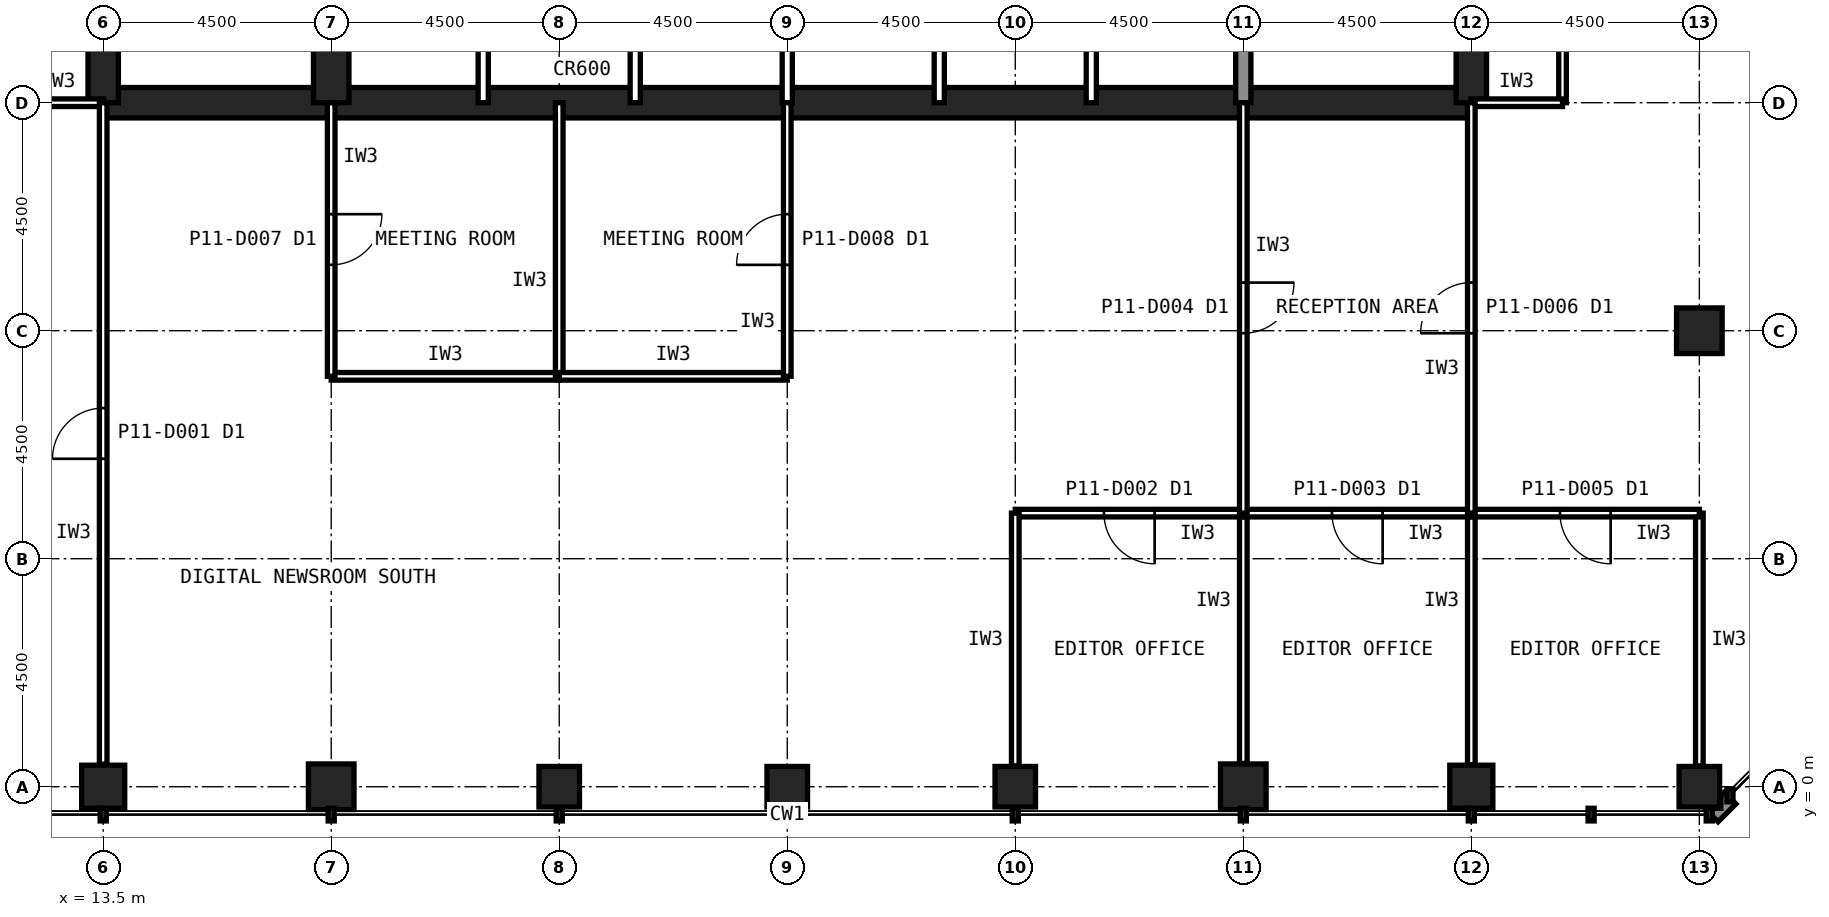
"""IFC4 building model, lengths in metres.
Left out: names, types, materials, properties, quantities, classifications, styles, units other than length and angle.
Written with IfcOpenShell. Run it as: python <this file> out.ifc"""

import sys

from ifc_helpers import new_model, si_unit, direction, frame, frame_2d, origin, origin_2d, place, context, subcontext, project, spatial, rectangle, hollow_rectangle, extrude, element, fill, save


model = new_model("IFC4")
c1 = context("Model", 3, precision=1e-05, world=origin(), true_north=direction((0.0, 1.0)))
c2 = subcontext(c1, "Body", "Model", "MODEL_VIEW")
j1 = project(units=[si_unit("LENGTHUNIT", "METRE"), si_unit("PLANEANGLEUNIT", "RADIAN")], contexts=[c1])
p1 = place(None, origin())
s1 = spatial("IfcSite", under=j1, at=p1, CompositionType="ELEMENT")
p2 = place(p1, origin())
s2 = spatial("IfcBuilding", under=s1, at=p2, CompositionType="ELEMENT")
p3 = place(p2, frame((0.0, 0.0, 45.8)))
s3 = spatial("IfcBuildingStorey", under=s2, at=p3, CompositionType="ELEMENT", Elevation=45.8)
p4 = place(p3, frame((13.5, 0.0, 0.0), z_axis=(0.0, 0.0, 1.0), x_axis=(1.0, 0.0, 0.0)))
e1 = element("IfcColumn", 1, at=p4, inside=s3, PredefinedType="COLUMN", context=c2, shape_type="SweptSolid", body=[
    extrude(hollow_rectangle(XDim=0.85, YDim=0.85, WallThickness=0.05, at=origin_2d()), origin(), (0.0, 0.0, 1.0), 4.2),
])
p5 = place(p3, frame((18.0, 0.0, 0.0), z_axis=(0.0, 0.0, 1.0), x_axis=(1.0, 0.0, 0.0)))
e2 = element("IfcColumn", 2, at=p5, inside=s3, PredefinedType="COLUMN", context=c2, shape_type="SweptSolid", body=[
    extrude(hollow_rectangle(XDim=0.9, YDim=0.9, WallThickness=0.063, at=origin_2d()), origin(), (0.0, 0.0, 1.0), 4.2),
])
for number, where, z_axis, x_axis in (
    (3, (22.5, 0.0, 0.0), (0.0, 0.0, 1.0), (1.0, 0.0, 0.0)),
    (4, (27.0, 0.0, 0.0), (0.0, 0.0, 1.0), (1.0, 0.0, 0.0)),
    (5, (31.5, 0.0, 0.0), (0.0, 0.0, 1.0), (1.0, 0.0, 0.0)),
):
    element("IfcColumn", number, at=place(p3, frame(where, z_axis=z_axis, x_axis=x_axis)), inside=s3, PredefinedType="COLUMN", context=c2, shape_type="SweptSolid", body=[
        extrude(hollow_rectangle(XDim=0.8, YDim=0.8, WallThickness=0.045, at=origin_2d()), origin(), (0.0, 0.0, 1.0), 4.2),
    ])
p6 = place(p3, frame((36.0, 0.0, 0.0), z_axis=(0.0, 0.0, 1.0), x_axis=(1.0, 0.0, 0.0)))
e6 = element("IfcColumn", 6, at=p6, inside=s3, PredefinedType="COLUMN", context=c2, shape_type="SweptSolid", body=[
    extrude(hollow_rectangle(XDim=0.9, YDim=0.9, WallThickness=0.063, at=origin_2d()), origin(), (0.0, 0.0, 1.0), 4.2),
])
p7 = place(p3, frame((40.5, 0.0, 0.0), z_axis=(0.0, 0.0, 1.0), x_axis=(1.0, 0.0, 0.0)))
e7 = element("IfcColumn", 7, at=p7, inside=s3, PredefinedType="COLUMN", context=c2, shape_type="SweptSolid", body=[
    extrude(hollow_rectangle(XDim=0.85, YDim=0.85, WallThickness=0.05, at=origin_2d()), origin(), (0.0, 0.0, 1.0), 4.2),
])
p8 = place(p3, frame((45.0, 0.0, 0.0), z_axis=(0.0, 0.0, 1.0), x_axis=(1.0, 0.0, 0.0)))
e8 = element("IfcColumn", 8, at=p8, inside=s3, PredefinedType="COLUMN", context=c2, shape_type="SweptSolid", body=[
    extrude(hollow_rectangle(XDim=0.8, YDim=0.8, WallThickness=0.045, at=origin_2d()), origin(), (0.0, 0.0, 1.0), 4.2),
])
p9 = place(p3, frame((45.0, 9.0, 0.0), z_axis=(0.0, 0.0, 1.0), x_axis=(1.0, 0.0, 0.0)))
e9 = element("IfcColumn", 9, at=p9, inside=s3, PredefinedType="COLUMN", context=c2, shape_type="SweptSolid", body=[
    extrude(hollow_rectangle(XDim=0.9, YDim=0.9, WallThickness=0.063, at=origin_2d()), origin(), (0.0, 0.0, 1.0), 4.2),
])
p10 = place(p3, frame((13.5, 13.5, 0.0), z_axis=(0.0, 0.0, 1.0), x_axis=(1.0, 0.0, 0.0)))
e10 = element("IfcWall", 10, at=p10, inside=s3, PredefinedType="SHEAR", context=c2, shape_type="SweptSolid", body=[
    extrude(rectangle(XDim=27.0, YDim=0.6, at=frame_2d((13.5, 0.0))), origin(), (0.0, 0.0, 1.0), 4.2),
])
p11 = place(p3, frame((40.5, 13.5, 0.0), z_axis=(0.0, 0.0, 1.0), x_axis=(0.0, 1.0, 0.0)))
e11 = element("IfcWall", 11, at=p11, inside=s3, PredefinedType="SHEAR", context=c2, shape_type="SweptSolid", body=[
    extrude(rectangle(XDim=27.0, YDim=0.6, at=frame_2d((13.5, 0.0))), origin(), (0.0, 0.0, 1.0), 4.2),
])
p12 = place(p11, frame((5.85, 0.0, 0.0)))
e12 = element("IfcOpeningElement", 12, at=p12, cuts=e11, PredefinedType="OPENING", context=c2, shape_type="SweptSolid", body=[
    extrude(rectangle(XDim=1.8, YDim=2.1, at=frame_2d((0.9, 1.05))), frame((0.0, 0.31, 0.0), z_axis=(0.0, -1.0, 0.0), x_axis=(1.0, 0.0, 0.0)), (0.0, 0.0, 1.0), 0.62),
])
p13 = place(p11, frame((19.65, 0.0, 0.0)))
e13 = element("IfcOpeningElement", 13, at=p13, cuts=e11, PredefinedType="OPENING", context=c2, shape_type="SweptSolid", body=[
    extrude(rectangle(XDim=1.2, YDim=2.1, at=frame_2d((0.6, 1.05))), frame((0.0, 0.31, 0.0), z_axis=(0.0, -1.0, 0.0), x_axis=(1.0, 0.0, 0.0)), (0.0, 0.0, 1.0), 0.62),
])
p14 = place(p3, frame((13.5, 40.5, 0.0), z_axis=(0.0, 0.0, 1.0), x_axis=(0.0, -1.0, 0.0)))
e14 = element("IfcWall", 14, at=p14, inside=s3, PredefinedType="SHEAR", context=c2, shape_type="SweptSolid", body=[
    extrude(rectangle(XDim=27.0, YDim=0.6, at=frame_2d((13.5, 0.0))), origin(), (0.0, 0.0, 1.0), 4.2),
])
p15 = place(p14, frame((19.65, 0.0, 0.0)))
e15 = element("IfcOpeningElement", 15, at=p15, cuts=e14, PredefinedType="OPENING", context=c2, shape_type="SweptSolid", body=[
    extrude(rectangle(XDim=1.2, YDim=2.1, at=frame_2d((0.6, 1.05))), frame((0.0, 0.31, 0.0), z_axis=(0.0, -1.0, 0.0), x_axis=(1.0, 0.0, 0.0)), (0.0, 0.0, 1.0), 0.62),
])
p16 = place(p14, frame((5.85, 0.0, 0.0)))
e16 = element("IfcOpeningElement", 16, at=p16, cuts=e14, PredefinedType="OPENING", context=c2, shape_type="SweptSolid", body=[
    extrude(rectangle(XDim=1.8, YDim=2.1, at=frame_2d((0.9, 1.05))), frame((0.0, 0.31, 0.0), z_axis=(0.0, -1.0, 0.0), x_axis=(1.0, 0.0, 0.0)), (0.0, 0.0, 1.0), 0.62),
])
p17 = place(p3, frame((18.0, 13.5, 0.0), z_axis=(0.0, 0.0, 1.0), x_axis=(0.0, 1.0, 0.0)))
e17 = element("IfcWall", 17, at=p17, inside=s3, PredefinedType="SHEAR", context=c2, shape_type="SweptSolid", body=[
    extrude(rectangle(XDim=18.0, YDim=0.7, at=frame_2d((9.0, 0.0))), origin(), (0.0, 0.0, 1.0), 4.2),
])
p18 = place(p3, frame((36.0, 13.5, 0.0), z_axis=(0.0, 0.0, 1.0), x_axis=(0.0, 1.0, 0.0)))
e18 = element("IfcWall", 18, at=p18, inside=s3, PredefinedType="SOLIDWALL", context=c2, shape_type="SweptSolid", body=[
    extrude(rectangle(XDim=4.5, YDim=0.3, at=frame_2d((2.25, 0.0))), origin(), (0.0, 0.0, 1.0), 4.04),
])
for number, where, z_axis, x_axis in (
    (19, (21.0, 13.5, 0.0), (0.0, 0.0, 1.0), (0.0, 1.0, 0.0)),
    (20, (24.0, 13.5, 0.0), (0.0, 0.0, 1.0), (0.0, 1.0, 0.0)),
    (21, (27.0, 13.5, 0.0), (0.0, 0.0, 1.0), (0.0, 1.0, 0.0)),
    (22, (30.0, 13.5, 0.0), (0.0, 0.0, 1.0), (0.0, 1.0, 0.0)),
    (23, (33.0, 13.5, 0.0), (0.0, 0.0, 1.0), (0.0, 1.0, 0.0)),
):
    element("IfcWall", number, at=place(p3, frame(where, z_axis=z_axis, x_axis=x_axis)), inside=s3, PredefinedType="PARTITIONING", context=c2, shape_type="SweptSolid", body=[
        extrude(rectangle(XDim=4.5, YDim=0.2, at=frame_2d((2.25, 0.0))), origin(), (0.0, 0.0, 1.0), 4.04),
    ])
p19 = place(p3, frame((42.3, 13.5, 0.0), z_axis=(0.0, 0.0, 1.0), x_axis=(0.0, 1.0, 0.0)))
e24 = element("IfcWall", 24, at=p19, inside=s3, PredefinedType="PARTITIONING", context=c2, shape_type="SweptSolid", body=[
    extrude(rectangle(XDim=28.8, YDim=0.15, at=frame_2d((14.4, 0.0))), origin(), (0.0, 0.0, 1.0), 4.04),
])
p20 = place(p19, frame((13.9, 0.0, 0.0)))
e25 = element("IfcOpeningElement", 25, at=p20, cuts=e24, PredefinedType="OPENING", context=c2, shape_type="SweptSolid", body=[
    extrude(rectangle(XDim=1.0, YDim=2.1, at=frame_2d((0.5, 1.05))), frame((0.0, 0.085, 0.0), z_axis=(0.0, -1.0, 0.0), x_axis=(1.0, 0.0, 0.0)), (0.0, 0.0, 1.0), 0.17),
])
for number, where, z_axis, x_axis in (
    (26, (11.7, 13.5, 0.0), (0.0, 0.0, 1.0), (1.0, 0.0, 0.0)),
    (27, (40.49, 13.5, 0.0), (0.0, 0.0, 1.0), (1.0, 0.0, 0.0)),
):
    element("IfcWall", number, at=place(p3, frame(where, z_axis=z_axis, x_axis=x_axis)), inside=s3, PredefinedType="PARTITIONING", context=c2, shape_type="SweptSolid", body=[
        extrude(rectangle(XDim=1.81, YDim=0.15, at=frame_2d((0.905, 0.0))), origin(), (0.0, 0.0, 1.0), 3.189),
    ])
p21 = place(p3, frame((18.0, 8.1, 0.0), z_axis=(0.0, 0.0, 1.0), x_axis=(1.0, 0.0, 0.0)))
e28 = element("IfcWall", 28, at=p21, inside=s3, PredefinedType="PARTITIONING", context=c2, shape_type="SweptSolid", body=[
    extrude(rectangle(XDim=4.5, YDim=0.15, at=frame_2d((2.25, 0.0))), origin(), (0.0, 0.0, 1.0), 4.04),
])
p22 = place(p3, frame((22.5, 8.1, 0.0), z_axis=(0.0, 0.0, 1.0), x_axis=(0.0, 1.0, 0.0)))
e29 = element("IfcWall", 29, at=p22, inside=s3, PredefinedType="PARTITIONING", context=c2, shape_type="SweptSolid", body=[
    extrude(rectangle(XDim=5.4, YDim=0.15, at=frame_2d((2.7, 0.0))), origin(), (0.0, 0.0, 1.0), 3.189),
])
p23 = place(p3, frame((18.0, 13.5, 0.0), z_axis=(0.0, 0.0, 1.0), x_axis=(0.0, -1.0, 0.0)))
e30 = element("IfcWall", 30, at=p23, inside=s3, PredefinedType="PARTITIONING", context=c2, shape_type="SweptSolid", body=[
    extrude(rectangle(XDim=5.4, YDim=0.15, at=frame_2d((2.7, 0.0))), origin(), (0.0, 0.0, 1.0), 3.189),
])
p24 = place(p23, frame((2.2, 0.0, 0.0)))
e31 = element("IfcOpeningElement", 31, at=p24, cuts=e30, PredefinedType="OPENING", context=c2, shape_type="SweptSolid", body=[
    extrude(rectangle(XDim=1.0, YDim=2.1, at=frame_2d((0.5, 1.05))), frame((0.0, 0.085, 0.0), z_axis=(0.0, -1.0, 0.0), x_axis=(1.0, 0.0, 0.0)), (0.0, 0.0, 1.0), 0.17),
])
p25 = place(p3, frame((22.5, 8.1, 0.0), z_axis=(0.0, 0.0, 1.0), x_axis=(1.0, 0.0, 0.0)))
e32 = element("IfcWall", 32, at=p25, inside=s3, PredefinedType="PARTITIONING", context=c2, shape_type="SweptSolid", body=[
    extrude(rectangle(XDim=4.5, YDim=0.15, at=frame_2d((2.25, 0.0))), origin(), (0.0, 0.0, 1.0), 4.04),
])
p26 = place(p3, frame((27.0, 8.1, 0.0), z_axis=(0.0, 0.0, 1.0), x_axis=(0.0, 1.0, 0.0)))
e33 = element("IfcWall", 33, at=p26, inside=s3, PredefinedType="PARTITIONING", context=c2, shape_type="SweptSolid", body=[
    extrude(rectangle(XDim=5.4, YDim=0.15, at=frame_2d((2.7, 0.0))), origin(), (0.0, 0.0, 1.0), 3.189),
])
p27 = place(p26, frame((2.2, 0.0, 0.0)))
e34 = element("IfcOpeningElement", 34, at=p27, cuts=e33, PredefinedType="OPENING", context=c2, shape_type="SweptSolid", body=[
    extrude(rectangle(XDim=1.0, YDim=2.1, at=frame_2d((0.5, 1.05))), frame((0.0, 0.085, 0.0), z_axis=(0.0, -1.0, 0.0), x_axis=(1.0, 0.0, 0.0)), (0.0, 0.0, 1.0), 0.17),
])
p28 = place(p3, frame((36.0, 0.46, 0.0), z_axis=(0.0, 0.0, 1.0), x_axis=(0.0, 1.0, 0.0)))
e35 = element("IfcWall", 35, at=p28, inside=s3, PredefinedType="PARTITIONING", context=c2, shape_type="SweptSolid", body=[
    extrude(rectangle(XDim=4.94, YDim=0.15, at=frame_2d((2.47, 0.0))), origin(), (0.0, 0.0, 1.0), 3.189),
])
p29 = place(p3, frame((36.0, 5.4, 0.0), z_axis=(0.0, 0.0, 1.0), x_axis=(-1.0, 0.0, 0.0)))
e36 = element("IfcWall", 36, at=p29, inside=s3, PredefinedType="PARTITIONING", context=c2, shape_type="SweptSolid", body=[
    extrude(rectangle(XDim=4.5, YDim=0.15, at=frame_2d((2.25, 0.0))), origin(), (0.0, 0.0, 1.0), 4.04),
])
p30 = place(p29, frame((1.75, 0.0, 0.0)))
e37 = element("IfcOpeningElement", 37, at=p30, cuts=e36, PredefinedType="OPENING", context=c2, shape_type="SweptSolid", body=[
    extrude(rectangle(XDim=1.0, YDim=2.1, at=frame_2d((0.5, 1.05))), frame((0.0, 0.085, 0.0), z_axis=(0.0, -1.0, 0.0), x_axis=(1.0, 0.0, 0.0)), (0.0, 0.0, 1.0), 0.17),
])
p31 = place(p3, frame((31.5, 5.4, 0.0), z_axis=(0.0, 0.0, 1.0), x_axis=(0.0, -1.0, 0.0)))
e38 = element("IfcWall", 38, at=p31, inside=s3, PredefinedType="PARTITIONING", context=c2, shape_type="SweptSolid", body=[
    extrude(rectangle(XDim=4.99, YDim=0.15, at=frame_2d((2.495, 0.0))), origin(), (0.0, 0.0, 1.0), 3.189),
])
p32 = place(p3, frame((40.5, 0.435, 0.0), z_axis=(0.0, 0.0, 1.0), x_axis=(0.0, 1.0, 0.0)))
e39 = element("IfcWall", 39, at=p32, inside=s3, PredefinedType="PARTITIONING", context=c2, shape_type="SweptSolid", body=[
    extrude(rectangle(XDim=4.965, YDim=0.15, at=frame_2d((2.482, 0.0))), origin(), (0.0, 0.0, 1.0), 3.189),
])
p33 = place(p3, frame((40.5, 5.4, 0.0), z_axis=(0.0, 0.0, 1.0), x_axis=(-1.0, 0.0, 0.0)))
e40 = element("IfcWall", 40, at=p33, inside=s3, PredefinedType="PARTITIONING", context=c2, shape_type="SweptSolid", body=[
    extrude(rectangle(XDim=4.5, YDim=0.15, at=frame_2d((2.25, 0.0))), origin(), (0.0, 0.0, 1.0), 4.04),
])
p34 = place(p33, frame((1.75, 0.0, 0.0)))
e41 = element("IfcOpeningElement", 41, at=p34, cuts=e40, PredefinedType="OPENING", context=c2, shape_type="SweptSolid", body=[
    extrude(rectangle(XDim=1.0, YDim=2.1, at=frame_2d((0.5, 1.05))), frame((0.0, 0.085, 0.0), z_axis=(0.0, -1.0, 0.0), x_axis=(1.0, 0.0, 0.0)), (0.0, 0.0, 1.0), 0.17),
])
p35 = place(p3, frame((45.0, 0.41, 0.0), z_axis=(0.0, 0.0, 1.0), x_axis=(0.0, 1.0, 0.0)))
e42 = element("IfcWall", 42, at=p35, inside=s3, PredefinedType="PARTITIONING", context=c2, shape_type="SweptSolid", body=[
    extrude(rectangle(XDim=4.99, YDim=0.15, at=frame_2d((2.495, 0.0))), origin(), (0.0, 0.0, 1.0), 3.429),
])
p36 = place(p3, frame((45.0, 5.4, 0.0), z_axis=(0.0, 0.0, 1.0), x_axis=(-1.0, 0.0, 0.0)))
e43 = element("IfcWall", 43, at=p36, inside=s3, PredefinedType="PARTITIONING", context=c2, shape_type="SweptSolid", body=[
    extrude(rectangle(XDim=4.5, YDim=0.15, at=frame_2d((2.25, 0.0))), origin(), (0.0, 0.0, 1.0), 4.04),
])
p37 = place(p36, frame((1.75, 0.0, 0.0)))
e44 = element("IfcOpeningElement", 44, at=p37, cuts=e43, PredefinedType="OPENING", context=c2, shape_type="SweptSolid", body=[
    extrude(rectangle(XDim=1.0, YDim=2.1, at=frame_2d((0.5, 1.05))), frame((0.0, 0.085, 0.0), z_axis=(0.0, -1.0, 0.0), x_axis=(1.0, 0.0, 0.0)), (0.0, 0.0, 1.0), 0.17),
])
p38 = place(p3, frame((40.5, 5.4, 0.0), z_axis=(0.0, 0.0, 1.0), x_axis=(0.0, 1.0, 0.0)))
e45 = element("IfcWall", 45, at=p38, inside=s3, PredefinedType="PARTITIONING", context=c2, shape_type="SweptSolid", body=[
    extrude(rectangle(XDim=8.1, YDim=0.15, at=frame_2d((4.05, 0.0))), origin(), (0.0, 0.0, 1.0), 3.189),
])
p39 = place(p38, frame((3.55, 0.0, 0.0)))
e46 = element("IfcOpeningElement", 46, at=p39, cuts=e45, PredefinedType="OPENING", context=c2, shape_type="SweptSolid", body=[
    extrude(rectangle(XDim=1.0, YDim=2.1, at=frame_2d((0.5, 1.05))), frame((0.0, 0.085, 0.0), z_axis=(0.0, -1.0, 0.0), x_axis=(1.0, 0.0, 0.0)), (0.0, 0.0, 1.0), 0.17),
])
p40 = place(p3, frame((13.5, 0.445, 0.0), z_axis=(0.0, 0.0, 1.0), x_axis=(0.0, 1.0, 0.0)))
e47 = element("IfcWall", 47, at=p40, inside=s3, PredefinedType="PARTITIONING", context=c2, shape_type="SweptSolid", body=[
    extrude(rectangle(XDim=13.055, YDim=0.15, at=frame_2d((6.527, 0.0))), origin(), (0.0, 0.0, 1.0), 3.189),
])
p41 = place(p40, frame((6.028, 0.0, 0.0)))
e48 = element("IfcOpeningElement", 48, at=p41, cuts=e47, PredefinedType="OPENING", context=c2, shape_type="SweptSolid", body=[
    extrude(rectangle(XDim=1.0, YDim=2.1, at=frame_2d((0.5, 1.05))), frame((0.0, 0.085, 0.0), z_axis=(0.0, -1.0, 0.0), x_axis=(1.0, 0.0, 0.0)), (0.0, 0.0, 1.0), 0.17),
])
p42 = place(p3, frame((36.0, 13.5, 0.0), z_axis=(0.0, 0.0, 1.0), x_axis=(0.0, -1.0, 0.0)))
e49 = element("IfcWall", 49, at=p42, inside=s3, PredefinedType="PARTITIONING", context=c2, shape_type="SweptSolid", body=[
    extrude(rectangle(XDim=8.1, YDim=0.15, at=frame_2d((4.05, 0.0))), origin(), (0.0, 0.0, 1.0), 3.189),
])
p43 = place(p42, frame((3.55, 0.0, 0.0)))
e50 = element("IfcOpeningElement", 50, at=p43, cuts=e49, PredefinedType="OPENING", context=c2, shape_type="SweptSolid", body=[
    extrude(rectangle(XDim=1.0, YDim=2.1, at=frame_2d((0.5, 1.05))), frame((0.0, 0.085, 0.0), z_axis=(0.0, -1.0, 0.0), x_axis=(1.0, 0.0, 0.0)), (0.0, 0.0, 1.0), 0.17),
])
p44 = place(p24, origin())
e51 = element("IfcDoor", 51, at=p44, inside=s3, OperationType="SINGLE_SWING_LEFT", PredefinedType="DOOR", context=c2, shape_type="SweptSolid", body=[
    extrude(rectangle(XDim=1.0, YDim=2.1, at=frame_2d((0.5, 1.05))), frame((0.0, 0.025, 0.0), z_axis=(0.0, -1.0, 0.0), x_axis=(1.0, 0.0, 0.0)), (0.0, 0.0, 1.0), 0.05),
])
fill(e31, e51)
p45 = place(p27, origin())
e52 = element("IfcDoor", 52, at=p45, inside=s3, OperationType="SINGLE_SWING_LEFT", PredefinedType="DOOR", context=c2, shape_type="SweptSolid", body=[
    extrude(rectangle(XDim=1.0, YDim=2.1, at=frame_2d((0.5, 1.05))), frame((0.0, 0.025, 0.0), z_axis=(0.0, -1.0, 0.0), x_axis=(1.0, 0.0, 0.0)), (0.0, 0.0, 1.0), 0.05),
])
fill(e34, e52)
p46 = place(p30, origin())
e53 = element("IfcDoor", 53, at=p46, inside=s3, OperationType="SINGLE_SWING_LEFT", PredefinedType="DOOR", context=c2, shape_type="SweptSolid", body=[
    extrude(rectangle(XDim=1.0, YDim=2.1, at=frame_2d((0.5, 1.05))), frame((0.0, 0.025, 0.0), z_axis=(0.0, -1.0, 0.0), x_axis=(1.0, 0.0, 0.0)), (0.0, 0.0, 1.0), 0.05),
])
fill(e37, e53)
p47 = place(p34, origin())
e54 = element("IfcDoor", 54, at=p47, inside=s3, OperationType="SINGLE_SWING_LEFT", PredefinedType="DOOR", context=c2, shape_type="SweptSolid", body=[
    extrude(rectangle(XDim=1.0, YDim=2.1, at=frame_2d((0.5, 1.05))), frame((0.0, 0.025, 0.0), z_axis=(0.0, -1.0, 0.0), x_axis=(1.0, 0.0, 0.0)), (0.0, 0.0, 1.0), 0.05),
])
fill(e41, e54)
p48 = place(p37, origin())
e55 = element("IfcDoor", 55, at=p48, inside=s3, OperationType="SINGLE_SWING_LEFT", PredefinedType="DOOR", context=c2, shape_type="SweptSolid", body=[
    extrude(rectangle(XDim=1.0, YDim=2.1, at=frame_2d((0.5, 1.05))), frame((0.0, 0.025, 0.0), z_axis=(0.0, -1.0, 0.0), x_axis=(1.0, 0.0, 0.0)), (0.0, 0.0, 1.0), 0.05),
])
fill(e44, e55)
p49 = place(p39, origin())
e56 = element("IfcDoor", 56, at=p49, inside=s3, OperationType="SINGLE_SWING_LEFT", PredefinedType="DOOR", context=c2, shape_type="SweptSolid", body=[
    extrude(rectangle(XDim=1.0, YDim=2.1, at=frame_2d((0.5, 1.05))), frame((0.0, 0.025, 0.0), z_axis=(0.0, -1.0, 0.0), x_axis=(1.0, 0.0, 0.0)), (0.0, 0.0, 1.0), 0.05),
])
fill(e46, e56)
p50 = place(p41, origin())
e57 = element("IfcDoor", 57, at=p50, inside=s3, OperationType="SINGLE_SWING_LEFT", PredefinedType="DOOR", context=c2, shape_type="SweptSolid", body=[
    extrude(rectangle(XDim=1.0, YDim=2.1, at=frame_2d((0.5, 1.05))), frame((0.0, 0.025, 0.0), z_axis=(0.0, -1.0, 0.0), x_axis=(1.0, 0.0, 0.0)), (0.0, 0.0, 1.0), 0.05),
])
fill(e48, e57)
p51 = place(p43, origin())
e58 = element("IfcDoor", 58, at=p51, inside=s3, OperationType="SINGLE_SWING_LEFT", PredefinedType="DOOR", context=c2, shape_type="SweptSolid", body=[
    extrude(rectangle(XDim=1.0, YDim=2.1, at=frame_2d((0.5, 1.05))), frame((0.0, 0.025, 0.0), z_axis=(0.0, -1.0, 0.0), x_axis=(1.0, 0.0, 0.0)), (0.0, 0.0, 1.0), 0.05),
])
fill(e50, e58)
save(model, sys.argv[1])
